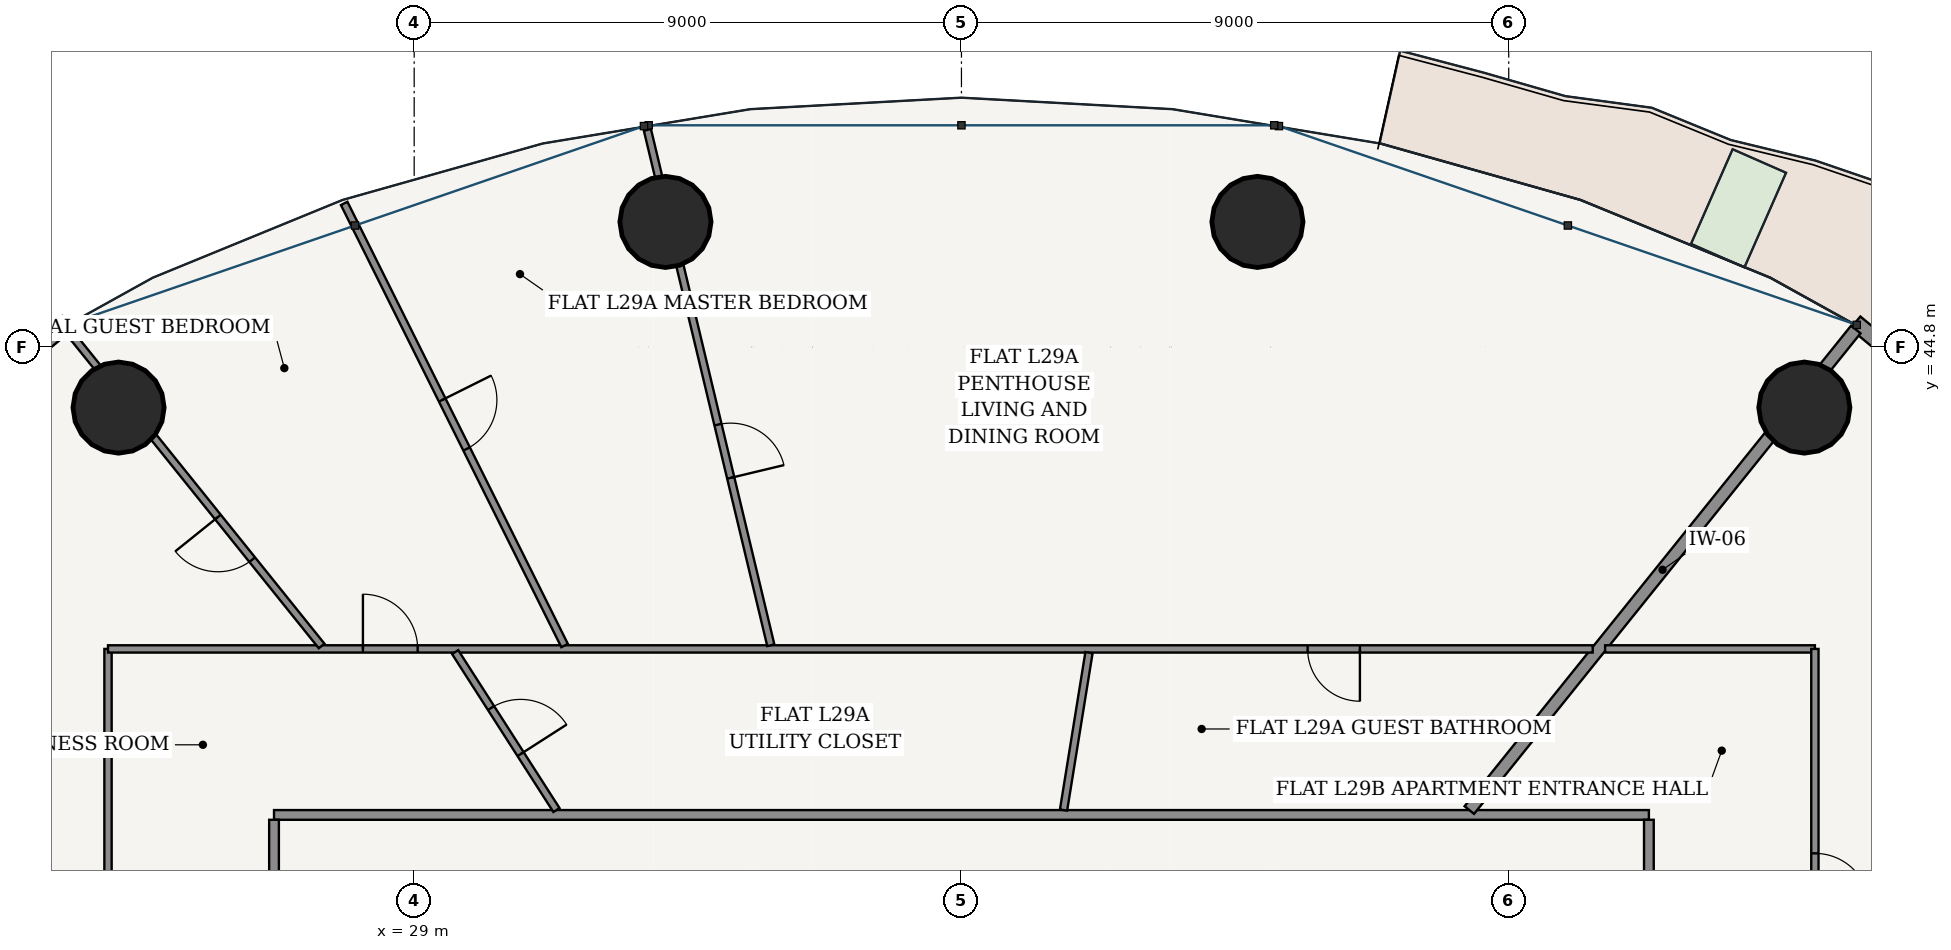
"""IFC4 building model, lengths in metres.
Left out: names, types, materials, properties, quantities, classifications, styles, units other than length and angle.
Written with IfcOpenShell. Run it as: python <this file> out.ifc"""

import sys

from ifc_helpers import new_model, si_unit, direction, frame, frame_2d, origin, origin_2d, place, context, subcontext, project, spatial, rectangle, hollow_circle, extrude, source, transform, mapped, element, fill, save


model = new_model("IFC4")
c1 = context("Model", 3, precision=1e-05, world=origin(), true_north=direction((-0.2419218956, 0.970295726276)))
c2 = subcontext(c1, "Body", "Model", "MODEL_VIEW")
j1 = project(units=[si_unit("LENGTHUNIT", "METRE"), si_unit("PLANEANGLEUNIT", "RADIAN")], contexts=[c1])
p1 = place(None, origin())
s1 = spatial("IfcSite", under=j1, at=p1, CompositionType="ELEMENT")
p2 = place(p1, origin())
s2 = spatial("IfcBuilding", under=s1, at=p2, CompositionType="ELEMENT")
p3 = place(p2, frame((0.0, 0.0, 112.2)))
s3 = spatial("IfcBuildingStorey", under=s2, at=p3, CompositionType="ELEMENT", Elevation=112.2)
for number, where, z_axis, x_axis in (
    (1, (51.862, 43.803, 0.0), (0.0, 0.0, 1.0), (1.0, 0.0, 0.0)),
    (2, (42.867, 46.857, 0.0), (0.0, 0.0, 1.0), (1.0, 0.0, 0.0)),
    (3, (33.133, 46.857, 0.0), (0.0, 0.0, 1.0), (1.0, 0.0, 0.0)),
    (4, (24.138, 43.803, 0.0), (0.0, 0.0, 1.0), (1.0, 0.0, 0.0)),
):
    element("IfcColumn", number, at=place(p3, frame(where, z_axis=z_axis, x_axis=x_axis)), inside=s3, PredefinedType="COLUMN", context=c2, shape_type="SweptSolid", body=[
        extrude(hollow_circle(Radius=0.75, WallThickness=0.045, at=origin_2d()), origin(), (0.0, 0.0, 1.0), 3.6),
    ])
p4 = place(p3, frame((60.154, 39.01, 0.0), z_axis=(0.0, 0.0, 1.0), x_axis=(-0.769242574941, 0.638956853706, 0.0)))
e5 = element("IfcWall", 5, at=p4, inside=s3, PredefinedType="SOLIDWALL", context=c2, shape_type="SweptSolid", body=[
    extrude(rectangle(XDim=9.69, YDim=0.26, at=frame_2d((4.845, 0.0))), origin(), (0.0, 0.0, 1.0), 3.325),
])
p5 = place(p4, frame((4.17, 0.0, 0.0)))
e6 = element("IfcOpeningElement", 6, at=p5, cuts=e5, PredefinedType="OPENING", context=c2, shape_type="SweptSolid", body=[
    extrude(rectangle(XDim=1.35, YDim=2.2, at=frame_2d((0.675, 1.1))), frame((0.0, 0.14, 0.0), z_axis=(0.0, -1.0, 0.0), x_axis=(1.0, 0.0, 0.0)), (0.0, 0.0, 1.0), 0.28),
])
p6 = place(p3, frame((23.3, 45.202, 0.0), z_axis=(0.0, 0.0, 1.0), x_axis=(-0.769242574941, -0.638956853706, 0.0)))
e7 = element("IfcWall", 7, at=p6, inside=s3, PredefinedType="SOLIDWALL", context=c2, shape_type="SweptSolid", body=[
    extrude(rectangle(XDim=9.69, YDim=0.28, at=frame_2d((4.845, 0.0))), origin(), (0.0, 0.0, 1.0), 3.325),
])
p7 = place(p6, frame((1.566, 0.0, 0.85)))
e8 = element("IfcOpeningElement", 8, at=p7, cuts=e7, PredefinedType="OPENING", context=c2, shape_type="SweptSolid", body=[
    extrude(rectangle(XDim=2.1, YDim=1.95, at=frame_2d((1.05, 0.975))), frame((0.0, 0.15, 0.0), z_axis=(0.0, -1.0, 0.0), x_axis=(1.0, 0.0, 0.0)), (0.0, 0.0, 1.0), 0.3),
])
p8 = place(p6, frame((6.023, 0.0, 0.85)))
e9 = element("IfcOpeningElement", 9, at=p8, cuts=e7, PredefinedType="OPENING", context=c2, shape_type="SweptSolid", body=[
    extrude(rectangle(XDim=2.1, YDim=1.95, at=frame_2d((1.05, 0.975))), frame((0.0, 0.15, 0.0), z_axis=(0.0, -1.0, 0.0), x_axis=(1.0, 0.0, 0.0)), (0.0, 0.0, 1.0), 0.3),
])
p9 = place(p3, frame((26.695, 37.105, 0.0), z_axis=(0.0, 0.0, 1.0), x_axis=(1.0, 0.0, 0.0)))
e10 = element("IfcWall", 10, at=p9, inside=s3, PredefinedType="PARTITIONING", context=c2, shape_type="SweptSolid", body=[
    extrude(rectangle(XDim=22.61, YDim=0.16, at=frame_2d((11.305, 0.0))), origin(), (0.0, 0.0, 1.0), 2.767),
])
p10 = place(p3, frame((26.695, 16.575, 0.0), z_axis=(0.0, 0.0, 1.0), x_axis=(0.0, 1.0, 0.0)))
e11 = element("IfcWall", 11, at=p10, inside=s3, PredefinedType="PARTITIONING", context=c2, shape_type="SweptSolid", body=[
    extrude(rectangle(XDim=20.45, YDim=0.16, at=frame_2d((10.225, 0.0))), origin(), (0.0, 0.0, 1.0), 2.767),
])
p11 = place(p10, frame((2.424, 0.0, 0.0)))
e12 = element("IfcOpeningElement", 12, at=p11, cuts=e11, PredefinedType="OPENING", context=c2, shape_type="SweptSolid", body=[
    extrude(rectangle(XDim=0.98, YDim=2.2, at=frame_2d((0.49, 1.1))), frame((0.0, 0.09, 0.0), z_axis=(0.0, -1.0, 0.0), x_axis=(1.0, 0.0, 0.0)), (0.0, 0.0, 1.0), 0.18),
])
p12 = place(p3, frame((49.305, 16.575, 0.0), z_axis=(0.0, 0.0, 1.0), x_axis=(0.0, 1.0, 0.0)))
e13 = element("IfcWall", 13, at=p12, inside=s3, PredefinedType="PARTITIONING", context=c2, shape_type="SweptSolid", body=[
    extrude(rectangle(XDim=20.45, YDim=0.16, at=frame_2d((10.225, 0.0))), origin(), (0.0, 0.0, 1.0), 2.767),
])
p13 = place(p12, frame((17.046, 0.0, 0.0)))
e14 = element("IfcOpeningElement", 14, at=p13, cuts=e13, PredefinedType="OPENING", context=c2, shape_type="SweptSolid", body=[
    extrude(rectangle(XDim=0.98, YDim=2.2, at=frame_2d((0.49, 1.1))), frame((0.0, 0.09, 0.0), z_axis=(0.0, -1.0, 0.0), x_axis=(1.0, 0.0, 0.0)), (0.0, 0.0, 1.0), 0.18),
])
p14 = place(p3, frame((46.352, 37.185, 0.0), z_axis=(0.0, 0.0, 1.0), x_axis=(0.626712884514, 0.779250255299, 0.0)))
e15 = element("IfcWall", 15, at=p14, inside=s3, PredefinedType="PARTITIONING", context=c2, shape_type="SweptSolid", body=[
    extrude(rectangle(XDim=10.141, YDim=0.2, at=frame_2d((5.07, 0.0))), origin(), (0.0, 0.0, 1.0), 2.767),
])
p15 = place(p3, frame((23.965, 13.765, 0.0), z_axis=(0.0, 0.0, 1.0), x_axis=(0.0, 1.0, 0.0)))
e16 = element("IfcWall", 16, at=p15, inside=s3, PredefinedType="PARTITIONING", context=c2, shape_type="SweptSolid", body=[
    extrude(rectangle(XDim=26.07, YDim=0.12, at=frame_2d((13.035, 0.0))), origin(), (0.0, 0.0, 1.0), 2.767),
])
p16 = place(p15, frame((3.362, 0.0, 0.0)))
e17 = element("IfcOpeningElement", 17, at=p16, cuts=e16, PredefinedType="OPENING", context=c2, shape_type="SweptSolid", body=[
    extrude(rectangle(XDim=0.9, YDim=2.15, at=frame_2d((0.45, 1.075))), frame((0.0, 0.07, 0.0), z_axis=(0.0, -1.0, 0.0), x_axis=(1.0, 0.0, 0.0)), (0.0, 0.0, 1.0), 0.14),
])
p17 = place(p15, frame((13.924, 0.0, 0.0)))
e18 = element("IfcOpeningElement", 18, at=p17, cuts=e16, PredefinedType="OPENING", context=c2, shape_type="SweptSolid", body=[
    extrude(rectangle(XDim=0.9, YDim=2.15, at=frame_2d((0.45, 1.075))), frame((0.0, 0.07, 0.0), z_axis=(0.0, -1.0, 0.0), x_axis=(1.0, 0.0, 0.0)), (0.0, 0.0, 1.0), 0.14),
])
p18 = place(p3, frame((23.965, 39.835, 0.0), z_axis=(0.0, 0.0, 1.0), x_axis=(1.0, 0.0, 0.0)))
e19 = element("IfcWall", 19, at=p18, inside=s3, PredefinedType="PARTITIONING", context=c2, shape_type="SweptSolid", body=[
    extrude(rectangle(XDim=24.416, YDim=0.12, at=frame_2d((12.208, 0.0))), origin(), (0.0, 0.0, 1.0), 2.767),
])
p19 = place(p18, frame((4.192, 0.0, 0.0)))
e20 = element("IfcOpeningElement", 20, at=p19, cuts=e19, PredefinedType="OPENING", context=c2, shape_type="SweptSolid", body=[
    extrude(rectangle(XDim=0.9, YDim=2.15, at=frame_2d((0.45, 1.075))), frame((0.0, 0.07, 0.0), z_axis=(0.0, -1.0, 0.0), x_axis=(1.0, 0.0, 0.0)), (0.0, 0.0, 1.0), 0.14),
])
p20 = place(p18, frame((19.728, 0.0, 0.0)))
e21 = element("IfcOpeningElement", 21, at=p20, cuts=e19, PredefinedType="OPENING", context=c2, shape_type="SweptSolid", body=[
    extrude(rectangle(XDim=0.86, YDim=2.15, at=frame_2d((0.43, 1.075))), frame((0.0, 0.07, 0.0), z_axis=(0.0, -1.0, 0.0), x_axis=(1.0, 0.0, 0.0)), (0.0, 0.0, 1.0), 0.14),
])
p21 = place(p3, frame((34.865, 39.895, 0.0), z_axis=(0.0, 0.0, 1.0), x_axis=(-0.23282725047, 0.97251810854, 0.0)))
e22 = element("IfcWall", 22, at=p21, inside=s3, PredefinedType="PARTITIONING", context=c2, shape_type="SweptSolid", body=[
    extrude(rectangle(XDim=8.715, YDim=0.12, at=frame_2d((4.357, 0.0))), origin(), (0.0, 0.0, 1.0), 2.767),
])
p22 = place(p21, frame((2.831, 0.0, 0.0)))
e23 = element("IfcOpeningElement", 23, at=p22, cuts=e22, PredefinedType="OPENING", context=c2, shape_type="SweptSolid", body=[
    extrude(rectangle(XDim=0.9, YDim=2.15, at=frame_2d((0.45, 1.075))), frame((0.0, 0.07, 0.0), z_axis=(0.0, -1.0, 0.0), x_axis=(1.0, 0.0, 0.0)), (0.0, 0.0, 1.0), 0.14),
])
p23 = place(p3, frame((31.474, 39.89, 0.0), z_axis=(0.0, 0.0, 1.0), x_axis=(-0.446167584581, 0.894949432353, 0.0)))
e24 = element("IfcWall", 24, at=p23, inside=s3, PredefinedType="PARTITIONING", context=c2, shape_type="SweptSolid", body=[
    extrude(rectangle(XDim=8.125, YDim=0.12, at=frame_2d((4.062, 0.0))), origin(), (0.0, 0.0, 1.0), 2.767),
])
p24 = place(p23, frame((3.612, 0.0, 0.0)))
e25 = element("IfcOpeningElement", 25, at=p24, cuts=e24, PredefinedType="OPENING", context=c2, shape_type="SweptSolid", body=[
    extrude(rectangle(XDim=0.9, YDim=2.15, at=frame_2d((0.45, 1.075))), frame((0.0, 0.07, 0.0), z_axis=(0.0, -1.0, 0.0), x_axis=(1.0, 0.0, 0.0)), (0.0, 0.0, 1.0), 0.14),
])
p25 = place(p3, frame((27.478, 39.883, 0.0), z_axis=(0.0, 0.0, 1.0), x_axis=(-0.62672583251, 0.779239841682, 0.0)))
e26 = element("IfcWall", 26, at=p25, inside=s3, PredefinedType="PARTITIONING", context=c2, shape_type="SweptSolid", body=[
    extrude(rectangle(XDim=6.678, YDim=0.12, at=frame_2d((3.339, 0.0))), origin(), (0.0, 0.0, 1.0), 2.767),
])
p26 = place(p25, frame((1.821, 0.0, 0.0)))
e27 = element("IfcOpeningElement", 27, at=p26, cuts=e26, PredefinedType="OPENING", context=c2, shape_type="SweptSolid", body=[
    extrude(rectangle(XDim=0.9, YDim=2.15, at=frame_2d((0.45, 1.075))), frame((0.0, 0.07, 0.0), z_axis=(0.0, -1.0, 0.0), x_axis=(1.0, 0.0, 0.0)), (0.0, 0.0, 1.0), 0.14),
])
p27 = place(p3, frame((23.911, 34.622, 0.0), z_axis=(0.0, 0.0, 1.0), x_axis=(-0.874324904351, 0.485341077626, 0.0)))
e28 = element("IfcWall", 28, at=p27, inside=s3, PredefinedType="PARTITIONING", context=c2, shape_type="SweptSolid", body=[
    extrude(rectangle(XDim=9.066, YDim=0.12, at=frame_2d((4.533, 0.0))), origin(), (0.0, 0.0, 1.0), 2.767),
])
p28 = place(p3, frame((39.679, 37.185, 0.0), z_axis=(0.0, 0.0, 1.0), x_axis=(0.159580767408, 0.98718487563, 0.0)))
e29 = element("IfcWall", 29, at=p28, inside=s3, PredefinedType="PARTITIONING", context=c2, shape_type="SweptSolid", body=[
    extrude(rectangle(XDim=2.622, YDim=0.12, at=frame_2d((1.311, 0.0))), origin(), (0.0, 0.0, 1.0), 3.325),
])
p29 = place(p3, frame((31.34, 37.185, 0.0), z_axis=(0.0, 0.0, 1.0), x_axis=(-0.539861631895, 0.841753775405, 0.0)))
e30 = element("IfcWall", 30, at=p29, inside=s3, PredefinedType="PARTITIONING", context=c2, shape_type="SweptSolid", body=[
    extrude(rectangle(XDim=3.086, YDim=0.12, at=frame_2d((1.543, 0.0))), origin(), (0.0, 0.0, 1.0), 3.325),
])
p30 = place(p29, frame((1.093, 0.0, 0.0)))
e31 = element("IfcOpeningElement", 31, at=p30, cuts=e30, PredefinedType="OPENING", context=c2, shape_type="SweptSolid", body=[
    extrude(rectangle(XDim=0.9, YDim=2.15, at=frame_2d((0.45, 1.075))), frame((0.0, 0.07, 0.0), z_axis=(0.0, -1.0, 0.0), x_axis=(1.0, 0.0, 0.0)), (0.0, 0.0, 1.0), 0.14),
])
p31 = place(p3, frame((48.585, 39.835, 0.0), z_axis=(0.0, 0.0, 1.0), x_axis=(1.0, 0.0, 0.0)))
e32 = element("IfcWall", 32, at=p31, inside=s3, PredefinedType="PARTITIONING", context=c2, shape_type="SweptSolid", body=[
    extrude(rectangle(XDim=3.45, YDim=0.12, at=frame_2d((1.725, 0.0))), origin(), (0.0, 0.0, 1.0), 2.767),
])
p32 = place(p3, frame((52.035, 39.835, 0.0), z_axis=(0.0, 0.0, 1.0), x_axis=(0.0, -1.0, 0.0)))
e33 = element("IfcWall", 33, at=p32, inside=s3, PredefinedType="PARTITIONING", context=c2, shape_type="SweptSolid", body=[
    extrude(rectangle(XDim=26.07, YDim=0.12, at=frame_2d((13.035, 0.0))), origin(), (0.0, 0.0, 1.0), 2.767),
])
p33 = place(p32, frame((3.362, 0.0, 0.0)))
e34 = element("IfcOpeningElement", 34, at=p33, cuts=e33, PredefinedType="OPENING", context=c2, shape_type="SweptSolid", body=[
    extrude(rectangle(XDim=0.9, YDim=2.15, at=frame_2d((0.45, 1.075))), frame((0.0, 0.07, 0.0), z_axis=(0.0, -1.0, 0.0), x_axis=(1.0, 0.0, 0.0)), (0.0, 0.0, 1.0), 0.14),
])
p34 = place(p32, frame((13.924, 0.0, 0.0)))
e35 = element("IfcOpeningElement", 35, at=p34, cuts=e33, PredefinedType="OPENING", context=c2, shape_type="SweptSolid", body=[
    extrude(rectangle(XDim=0.9, YDim=2.15, at=frame_2d((0.45, 1.075))), frame((0.0, 0.07, 0.0), z_axis=(0.0, -1.0, 0.0), x_axis=(1.0, 0.0, 0.0)), (0.0, 0.0, 1.0), 0.14),
])
m1 = source(origin(), c2, "Body", "SweptSolid", [
    extrude(rectangle(XDim=0.9, YDim=2.15, at=frame_2d((0.45, 1.075))), frame((0.0, 0.025, 0.0), z_axis=(0.0, -1.0, 0.0), x_axis=(1.0, 0.0, 0.0)), (0.0, 0.0, 1.0), 0.05),
])
p35 = place(p19, origin())
e36 = element("IfcDoor", 36, at=p35, inside=s3, OperationType="SINGLE_SWING_LEFT", PredefinedType="DOOR", context=c2, shape_type="MappedRepresentation", body=[
    mapped(m1, transform((0.0, 0.0, 0.0), scale=1.0)),
])
fill(e20, e36)
p36 = place(p26, origin())
e37 = element("IfcDoor", 37, at=p36, inside=s3, OperationType="SINGLE_SWING_RIGHT", PredefinedType="DOOR", context=c2, shape_type="MappedRepresentation", body=[
    mapped(m1, transform((0.0, 0.0, 0.0), scale=1.0)),
])
fill(e27, e37)
p37 = place(p30, frame((0.9, 0.0, 0.0), z_axis=(0.0, 0.0, 1.0), x_axis=(-1.0, 0.0, 0.0)))
e38 = element("IfcDoor", 38, at=p37, inside=s3, OperationType="SINGLE_SWING_RIGHT", PredefinedType="DOOR", context=c2, shape_type="MappedRepresentation", body=[
    mapped(m1, transform((0.0, 0.0, 0.0), scale=1.0)),
])
fill(e31, e38)
p38 = place(p24, frame((0.9, 0.0, 0.0), z_axis=(0.0, 0.0, 1.0), x_axis=(-1.0, 0.0, 0.0)))
e39 = element("IfcDoor", 39, at=p38, inside=s3, OperationType="SINGLE_SWING_LEFT", PredefinedType="DOOR", context=c2, shape_type="MappedRepresentation", body=[
    mapped(m1, transform((0.0, 0.0, 0.0), scale=1.0)),
])
fill(e25, e39)
p39 = place(p22, frame((0.9, 0.0, 0.0), z_axis=(0.0, 0.0, 1.0), x_axis=(-1.0, 0.0, 0.0)))
e40 = element("IfcDoor", 40, at=p39, inside=s3, OperationType="SINGLE_SWING_RIGHT", PredefinedType="DOOR", context=c2, shape_type="MappedRepresentation", body=[
    mapped(m1, transform((0.0, 0.0, 0.0), scale=1.0)),
])
fill(e23, e40)
m2 = source(origin(), c2, "Body", "SweptSolid", [
    extrude(rectangle(XDim=0.86, YDim=2.15, at=frame_2d((0.43, 1.075))), frame((0.0, 0.025, 0.0), z_axis=(0.0, -1.0, 0.0), x_axis=(1.0, 0.0, 0.0)), (0.0, 0.0, 1.0), 0.05),
])
p40 = place(p20, frame((0.86, 0.0, 0.0), z_axis=(0.0, 0.0, 1.0), x_axis=(-1.0, 0.0, 0.0)))
e41 = element("IfcDoor", 41, at=p40, inside=s3, OperationType="SINGLE_SWING_LEFT", PredefinedType="DOOR", context=c2, shape_type="MappedRepresentation", body=[
    mapped(m2, transform((0.0, 0.0, 0.0), scale=1.0)),
])
fill(e21, e41)
p41 = place(p33, origin())
e42 = element("IfcDoor", 42, at=p41, inside=s3, OperationType="SINGLE_SWING_RIGHT", PredefinedType="DOOR", context=c2, shape_type="MappedRepresentation", body=[
    mapped(m1, transform((0.0, 0.0, 0.0), scale=1.0)),
])
fill(e34, e42)
save(model, sys.argv[1])
